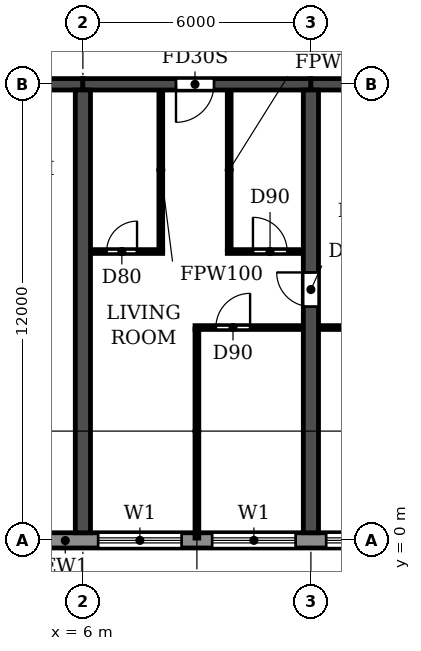
"""IFC4 building model, lengths in metres.
Left out: names, types, materials, properties, quantities, classifications, styles, units other than length and angle.
Written with IfcOpenShell. Run it as: python <this file> out.ifc"""

import sys

from ifc_helpers import new_model, si_unit, direction, frame, frame_2d, origin, place, context, subcontext, project, spatial, rectangle, extrude, element, fill, save


model = new_model("IFC4")
c1 = context("Model", 3, precision=1e-05, world=origin(), true_north=direction((0.0, 1.0)))
c2 = subcontext(c1, "Body", "Model", "MODEL_VIEW")
j1 = project(units=[si_unit("LENGTHUNIT", "METRE"), si_unit("PLANEANGLEUNIT", "RADIAN")], contexts=[c1])
p1 = place(None, origin())
s1 = spatial("IfcSite", under=j1, at=p1, CompositionType="ELEMENT")
p2 = place(p1, origin())
s2 = spatial("IfcBuilding", under=s1, at=p2, CompositionType="ELEMENT")
p3 = place(p2, frame((0.0, 0.0, 26.7)))
s3 = spatial("IfcBuildingStorey", under=s2, at=p3, CompositionType="ELEMENT", Elevation=26.7)
p4 = place(p3, frame((6.0, 0.2, 0.0), z_axis=(0.0, 0.0, 1.0), x_axis=(0.0, 1.0, 0.0)))
e1 = element("IfcWall", 1, at=p4, inside=s3, PredefinedType="SHEAR", context=c2, shape_type="SweptSolid", body=[
    extrude(rectangle(XDim=11.65, YDim=0.4, at=frame_2d((5.825, 0.0))), origin(), (0.0, 0.0, 1.0), 3.05),
])
p5 = place(p3, frame((12.0, 0.2, 0.0), z_axis=(0.0, 0.0, 1.0), x_axis=(0.0, 1.0, 0.0)))
e2 = element("IfcWall", 2, at=p5, inside=s3, PredefinedType="SHEAR", context=c2, shape_type="SweptSolid", body=[
    extrude(rectangle(XDim=11.65, YDim=0.4, at=frame_2d((5.825, 0.0))), origin(), (0.0, 0.0, 1.0), 3.05),
])
p6 = place(p5, frame((5.95, 0.0, 0.0)))
e3 = element("IfcOpeningElement", 3, at=p6, cuts=e2, PredefinedType="OPENING", context=c2, shape_type="SweptSolid", body=[
    extrude(rectangle(XDim=0.9, YDim=2.1, at=frame_2d((0.45, 1.05))), frame((0.0, 0.21, 0.0), z_axis=(0.0, -1.0, 0.0), x_axis=(1.0, 0.0, 0.0)), (0.0, 0.0, 1.0), 0.42),
])
p7 = place(p3, frame((0.2, 12.0, 0.0), z_axis=(0.0, 0.0, 1.0), x_axis=(1.0, 0.0, 0.0)))
e4 = element("IfcWall", 4, at=p7, inside=s3, PredefinedType="SHEAR", context=c2, shape_type="SweptSolid", body=[
    extrude(rectangle(XDim=5.8, YDim=0.3, at=frame_2d((2.9, 0.0))), origin(), (0.0, 0.0, 1.0), 2.45),
])
p8 = place(p7, frame((2.3, 0.0, 0.0)))
e5 = element("IfcOpeningElement", 5, at=p8, cuts=e4, PredefinedType="OPENING", context=c2, shape_type="SweptSolid", body=[
    extrude(rectangle(XDim=1.0, YDim=2.1, at=frame_2d((0.5, 1.05))), frame((0.0, 0.16, 0.0), z_axis=(0.0, -1.0, 0.0), x_axis=(1.0, 0.0, 0.0)), (0.0, 0.0, 1.0), 0.32),
])
p9 = place(p3, frame((6.0, 12.0, 0.0), z_axis=(0.0, 0.0, 1.0), x_axis=(1.0, 0.0, 0.0)))
e6 = element("IfcWall", 6, at=p9, inside=s3, PredefinedType="SHEAR", context=c2, shape_type="SweptSolid", body=[
    extrude(rectangle(XDim=6.0, YDim=0.3, at=frame_2d((3.0, 0.0))), origin(), (0.0, 0.0, 1.0), 2.45),
])
p10 = place(p9, frame((2.45, 0.0, 0.0)))
e7 = element("IfcOpeningElement", 7, at=p10, cuts=e6, PredefinedType="OPENING", context=c2, shape_type="SweptSolid", body=[
    extrude(rectangle(XDim=1.0, YDim=2.1, at=frame_2d((0.5, 1.05))), frame((0.0, 0.16, 0.0), z_axis=(0.0, -1.0, 0.0), x_axis=(1.0, 0.0, 0.0)), (0.0, 0.0, 1.0), 0.32),
])
p11 = place(p3, frame((12.0, 12.0, 0.0), z_axis=(0.0, 0.0, 1.0), x_axis=(1.0, 0.0, 0.0)))
e8 = element("IfcWall", 8, at=p11, inside=s3, PredefinedType="SHEAR", context=c2, shape_type="SweptSolid", body=[
    extrude(rectangle(XDim=6.0, YDim=0.3, at=frame_2d((3.0, 0.0))), origin(), (0.0, 0.0, 1.0), 2.45),
])
p12 = place(p3, frame((4.683, 0.0, 0.0), z_axis=(0.0, 0.0, 1.0), x_axis=(1.0, 0.0, 0.0)))
e9 = element("IfcWall", 9, at=p12, inside=s3, PredefinedType="STANDARD", context=c2, shape_type="SweptSolid", body=[
    extrude(rectangle(XDim=92.634, YDim=0.4, at=frame_2d((46.317, 0.0))), origin(), (0.0, 0.0, 1.0), 3.05),
])
p13 = place(p12, frame((1.717, 0.0, 0.9)))
e10 = element("IfcOpeningElement", 10, at=p13, cuts=e9, PredefinedType="OPENING", context=c2, shape_type="SweptSolid", body=[
    extrude(rectangle(XDim=2.2, YDim=1.5, at=frame_2d((1.1, 0.75))), frame((0.0, 0.21, 0.0), z_axis=(0.0, -1.0, 0.0), x_axis=(1.0, 0.0, 0.0)), (0.0, 0.0, 1.0), 0.42),
])
p14 = place(p12, frame((4.717, 0.0, 0.9)))
e11 = element("IfcOpeningElement", 11, at=p14, cuts=e9, PredefinedType="OPENING", context=c2, shape_type="SweptSolid", body=[
    extrude(rectangle(XDim=2.2, YDim=1.5, at=frame_2d((1.1, 0.75))), frame((0.0, 0.21, 0.0), z_axis=(0.0, -1.0, 0.0), x_axis=(1.0, 0.0, 0.0)), (0.0, 0.0, 1.0), 0.42),
])
p15 = place(p12, frame((7.717, 0.0, 0.9)))
e12 = element("IfcOpeningElement", 12, at=p15, cuts=e9, PredefinedType="OPENING", context=c2, shape_type="SweptSolid", body=[
    extrude(rectangle(XDim=2.2, YDim=1.5, at=frame_2d((1.1, 0.75))), frame((0.0, 0.21, 0.0), z_axis=(0.0, -1.0, 0.0), x_axis=(1.0, 0.0, 0.0)), (0.0, 0.0, 1.0), 0.42),
])
p16 = place(p12, frame((10.717, 0.0, 0.9)))
e13 = element("IfcOpeningElement", 13, at=p16, cuts=e9, PredefinedType="OPENING", context=c2, shape_type="SweptSolid", body=[
    extrude(rectangle(XDim=2.2, YDim=1.5, at=frame_2d((1.1, 0.75))), frame((0.0, 0.21, 0.0), z_axis=(0.0, -1.0, 0.0), x_axis=(1.0, 0.0, 0.0)), (0.0, 0.0, 1.0), 0.42),
])
p17 = place(p12, frame((13.717, 0.0, 0.9)))
e14 = element("IfcOpeningElement", 14, at=p17, cuts=e9, PredefinedType="OPENING", context=c2, shape_type="SweptSolid", body=[
    extrude(rectangle(XDim=2.2, YDim=1.5, at=frame_2d((1.1, 0.75))), frame((0.0, 0.21, 0.0), z_axis=(0.0, -1.0, 0.0), x_axis=(1.0, 0.0, 0.0)), (0.0, 0.0, 1.0), 0.42),
])
p18 = place(p12, frame((16.717, 0.0, 0.9)))
e15 = element("IfcOpeningElement", 15, at=p18, cuts=e9, PredefinedType="OPENING", context=c2, shape_type="SweptSolid", body=[
    extrude(rectangle(XDim=2.2, YDim=1.5, at=frame_2d((1.1, 0.75))), frame((0.0, 0.21, 0.0), z_axis=(0.0, -1.0, 0.0), x_axis=(1.0, 0.0, 0.0)), (0.0, 0.0, 1.0), 0.42),
])
p19 = place(p12, frame((19.917, 0.0, 0.0)))
e16 = element("IfcOpeningElement", 16, at=p19, cuts=e9, PredefinedType="OPENING", context=c2, shape_type="SweptSolid", body=[
    extrude(rectangle(XDim=1.8, YDim=2.4, at=frame_2d((0.9, 1.2))), frame((0.0, 0.21, 0.0), z_axis=(0.0, -1.0, 0.0), x_axis=(1.0, 0.0, 0.0)), (0.0, 0.0, 1.0), 0.42),
])
p20 = place(p12, frame((22.717, 0.0, 0.9)))
e17 = element("IfcOpeningElement", 17, at=p20, cuts=e9, PredefinedType="OPENING", context=c2, shape_type="SweptSolid", body=[
    extrude(rectangle(XDim=2.2, YDim=1.5, at=frame_2d((1.1, 0.75))), frame((0.0, 0.21, 0.0), z_axis=(0.0, -1.0, 0.0), x_axis=(1.0, 0.0, 0.0)), (0.0, 0.0, 1.0), 0.42),
])
p21 = place(p12, frame((25.717, 0.0, 0.9)))
e18 = element("IfcOpeningElement", 18, at=p21, cuts=e9, PredefinedType="OPENING", context=c2, shape_type="SweptSolid", body=[
    extrude(rectangle(XDim=2.2, YDim=1.5, at=frame_2d((1.1, 0.75))), frame((0.0, 0.21, 0.0), z_axis=(0.0, -1.0, 0.0), x_axis=(1.0, 0.0, 0.0)), (0.0, 0.0, 1.0), 0.42),
])
p22 = place(p12, frame((28.717, 0.0, 0.9)))
e19 = element("IfcOpeningElement", 19, at=p22, cuts=e9, PredefinedType="OPENING", context=c2, shape_type="SweptSolid", body=[
    extrude(rectangle(XDim=2.2, YDim=1.5, at=frame_2d((1.1, 0.75))), frame((0.0, 0.21, 0.0), z_axis=(0.0, -1.0, 0.0), x_axis=(1.0, 0.0, 0.0)), (0.0, 0.0, 1.0), 0.42),
])
p23 = place(p12, frame((31.917, 0.0, 0.0)))
e20 = element("IfcOpeningElement", 20, at=p23, cuts=e9, PredefinedType="OPENING", context=c2, shape_type="SweptSolid", body=[
    extrude(rectangle(XDim=1.8, YDim=2.4, at=frame_2d((0.9, 1.2))), frame((0.0, 0.21, 0.0), z_axis=(0.0, -1.0, 0.0), x_axis=(1.0, 0.0, 0.0)), (0.0, 0.0, 1.0), 0.42),
])
p24 = place(p12, frame((34.717, 0.0, 0.9)))
e21 = element("IfcOpeningElement", 21, at=p24, cuts=e9, PredefinedType="OPENING", context=c2, shape_type="SweptSolid", body=[
    extrude(rectangle(XDim=2.2, YDim=1.5, at=frame_2d((1.1, 0.75))), frame((0.0, 0.21, 0.0), z_axis=(0.0, -1.0, 0.0), x_axis=(1.0, 0.0, 0.0)), (0.0, 0.0, 1.0), 0.42),
])
p25 = place(p12, frame((37.717, 0.0, 0.9)))
e22 = element("IfcOpeningElement", 22, at=p25, cuts=e9, PredefinedType="OPENING", context=c2, shape_type="SweptSolid", body=[
    extrude(rectangle(XDim=2.2, YDim=1.5, at=frame_2d((1.1, 0.75))), frame((0.0, 0.21, 0.0), z_axis=(0.0, -1.0, 0.0), x_axis=(1.0, 0.0, 0.0)), (0.0, 0.0, 1.0), 0.42),
])
p26 = place(p12, frame((40.717, 0.0, 0.9)))
e23 = element("IfcOpeningElement", 23, at=p26, cuts=e9, PredefinedType="OPENING", context=c2, shape_type="SweptSolid", body=[
    extrude(rectangle(XDim=2.2, YDim=1.5, at=frame_2d((1.1, 0.75))), frame((0.0, 0.21, 0.0), z_axis=(0.0, -1.0, 0.0), x_axis=(1.0, 0.0, 0.0)), (0.0, 0.0, 1.0), 0.42),
])
p27 = place(p12, frame((43.917, 0.0, 0.0)))
e24 = element("IfcOpeningElement", 24, at=p27, cuts=e9, PredefinedType="OPENING", context=c2, shape_type="SweptSolid", body=[
    extrude(rectangle(XDim=1.8, YDim=2.4, at=frame_2d((0.9, 1.2))), frame((0.0, 0.21, 0.0), z_axis=(0.0, -1.0, 0.0), x_axis=(1.0, 0.0, 0.0)), (0.0, 0.0, 1.0), 0.42),
])
p28 = place(p12, frame((46.717, 0.0, 0.9)))
e25 = element("IfcOpeningElement", 25, at=p28, cuts=e9, PredefinedType="OPENING", context=c2, shape_type="SweptSolid", body=[
    extrude(rectangle(XDim=2.2, YDim=1.5, at=frame_2d((1.1, 0.75))), frame((0.0, 0.21, 0.0), z_axis=(0.0, -1.0, 0.0), x_axis=(1.0, 0.0, 0.0)), (0.0, 0.0, 1.0), 0.42),
])
p29 = place(p12, frame((49.717, 0.0, 0.9)))
e26 = element("IfcOpeningElement", 26, at=p29, cuts=e9, PredefinedType="OPENING", context=c2, shape_type="SweptSolid", body=[
    extrude(rectangle(XDim=2.2, YDim=1.5, at=frame_2d((1.1, 0.75))), frame((0.0, 0.21, 0.0), z_axis=(0.0, -1.0, 0.0), x_axis=(1.0, 0.0, 0.0)), (0.0, 0.0, 1.0), 0.42),
])
p30 = place(p12, frame((52.717, 0.0, 0.9)))
e27 = element("IfcOpeningElement", 27, at=p30, cuts=e9, PredefinedType="OPENING", context=c2, shape_type="SweptSolid", body=[
    extrude(rectangle(XDim=2.2, YDim=1.5, at=frame_2d((1.1, 0.75))), frame((0.0, 0.21, 0.0), z_axis=(0.0, -1.0, 0.0), x_axis=(1.0, 0.0, 0.0)), (0.0, 0.0, 1.0), 0.42),
])
p31 = place(p12, frame((55.717, 0.0, 0.9)))
e28 = element("IfcOpeningElement", 28, at=p31, cuts=e9, PredefinedType="OPENING", context=c2, shape_type="SweptSolid", body=[
    extrude(rectangle(XDim=2.2, YDim=1.5, at=frame_2d((1.1, 0.75))), frame((0.0, 0.21, 0.0), z_axis=(0.0, -1.0, 0.0), x_axis=(1.0, 0.0, 0.0)), (0.0, 0.0, 1.0), 0.42),
])
p32 = place(p12, frame((58.917, 0.0, 0.0)))
e29 = element("IfcOpeningElement", 29, at=p32, cuts=e9, PredefinedType="OPENING", context=c2, shape_type="SweptSolid", body=[
    extrude(rectangle(XDim=1.8, YDim=2.4, at=frame_2d((0.9, 1.2))), frame((0.0, 0.21, 0.0), z_axis=(0.0, -1.0, 0.0), x_axis=(1.0, 0.0, 0.0)), (0.0, 0.0, 1.0), 0.42),
])
p33 = place(p12, frame((61.717, 0.0, 0.9)))
e30 = element("IfcOpeningElement", 30, at=p33, cuts=e9, PredefinedType="OPENING", context=c2, shape_type="SweptSolid", body=[
    extrude(rectangle(XDim=2.2, YDim=1.5, at=frame_2d((1.1, 0.75))), frame((0.0, 0.21, 0.0), z_axis=(0.0, -1.0, 0.0), x_axis=(1.0, 0.0, 0.0)), (0.0, 0.0, 1.0), 0.42),
])
p34 = place(p12, frame((64.717, 0.0, 0.9)))
e31 = element("IfcOpeningElement", 31, at=p34, cuts=e9, PredefinedType="OPENING", context=c2, shape_type="SweptSolid", body=[
    extrude(rectangle(XDim=2.2, YDim=1.5, at=frame_2d((1.1, 0.75))), frame((0.0, 0.21, 0.0), z_axis=(0.0, -1.0, 0.0), x_axis=(1.0, 0.0, 0.0)), (0.0, 0.0, 1.0), 0.42),
])
p35 = place(p12, frame((67.717, 0.0, 0.9)))
e32 = element("IfcOpeningElement", 32, at=p35, cuts=e9, PredefinedType="OPENING", context=c2, shape_type="SweptSolid", body=[
    extrude(rectangle(XDim=2.2, YDim=1.5, at=frame_2d((1.1, 0.75))), frame((0.0, 0.21, 0.0), z_axis=(0.0, -1.0, 0.0), x_axis=(1.0, 0.0, 0.0)), (0.0, 0.0, 1.0), 0.42),
])
p36 = place(p12, frame((70.917, 0.0, 0.0)))
e33 = element("IfcOpeningElement", 33, at=p36, cuts=e9, PredefinedType="OPENING", context=c2, shape_type="SweptSolid", body=[
    extrude(rectangle(XDim=1.8, YDim=2.4, at=frame_2d((0.9, 1.2))), frame((0.0, 0.21, 0.0), z_axis=(0.0, -1.0, 0.0), x_axis=(1.0, 0.0, 0.0)), (0.0, 0.0, 1.0), 0.42),
])
p37 = place(p12, frame((73.717, 0.0, 0.9)))
e34 = element("IfcOpeningElement", 34, at=p37, cuts=e9, PredefinedType="OPENING", context=c2, shape_type="SweptSolid", body=[
    extrude(rectangle(XDim=2.2, YDim=1.5, at=frame_2d((1.1, 0.75))), frame((0.0, 0.21, 0.0), z_axis=(0.0, -1.0, 0.0), x_axis=(1.0, 0.0, 0.0)), (0.0, 0.0, 1.0), 0.42),
])
p38 = place(p12, frame((76.717, 0.0, 0.9)))
e35 = element("IfcOpeningElement", 35, at=p38, cuts=e9, PredefinedType="OPENING", context=c2, shape_type="SweptSolid", body=[
    extrude(rectangle(XDim=2.2, YDim=1.5, at=frame_2d((1.1, 0.75))), frame((0.0, 0.21, 0.0), z_axis=(0.0, -1.0, 0.0), x_axis=(1.0, 0.0, 0.0)), (0.0, 0.0, 1.0), 0.42),
])
p39 = place(p12, frame((79.717, 0.0, 0.9)))
e36 = element("IfcOpeningElement", 36, at=p39, cuts=e9, PredefinedType="OPENING", context=c2, shape_type="SweptSolid", body=[
    extrude(rectangle(XDim=2.2, YDim=1.5, at=frame_2d((1.1, 0.75))), frame((0.0, 0.21, 0.0), z_axis=(0.0, -1.0, 0.0), x_axis=(1.0, 0.0, 0.0)), (0.0, 0.0, 1.0), 0.42),
])
p40 = place(p12, frame((82.717, 0.0, 0.9)))
e37 = element("IfcOpeningElement", 37, at=p40, cuts=e9, PredefinedType="OPENING", context=c2, shape_type="SweptSolid", body=[
    extrude(rectangle(XDim=2.2, YDim=1.5, at=frame_2d((1.1, 0.75))), frame((0.0, 0.21, 0.0), z_axis=(0.0, -1.0, 0.0), x_axis=(1.0, 0.0, 0.0)), (0.0, 0.0, 1.0), 0.42),
])
p41 = place(p12, frame((85.717, 0.0, 0.9)))
e38 = element("IfcOpeningElement", 38, at=p41, cuts=e9, PredefinedType="OPENING", context=c2, shape_type="SweptSolid", body=[
    extrude(rectangle(XDim=2.2, YDim=1.5, at=frame_2d((1.1, 0.75))), frame((0.0, 0.21, 0.0), z_axis=(0.0, -1.0, 0.0), x_axis=(1.0, 0.0, 0.0)), (0.0, 0.0, 1.0), 0.42),
])
p42 = place(p12, frame((88.717, 0.0, 0.9)))
e39 = element("IfcOpeningElement", 39, at=p42, cuts=e9, PredefinedType="OPENING", context=c2, shape_type="SweptSolid", body=[
    extrude(rectangle(XDim=2.2, YDim=1.5, at=frame_2d((1.1, 0.75))), frame((0.0, 0.21, 0.0), z_axis=(0.0, -1.0, 0.0), x_axis=(1.0, 0.0, 0.0)), (0.0, 0.0, 1.0), 0.42),
])
p43 = place(p3, frame((8.95, 5.6, 0.0), z_axis=(0.0, 0.0, 1.0), x_axis=(1.0, 0.0, 0.0)))
e40 = element("IfcWall", 40, at=p43, inside=s3, PredefinedType="PARTITIONING", context=c2, shape_type="SweptSolid", body=[
    extrude(rectangle(XDim=2.84, YDim=0.1, at=frame_2d((1.42, 0.0))), origin(), (0.0, 0.0, 1.0), 3.05),
])
p44 = place(p43, frame((0.55, 0.0, 0.0)))
e41 = element("IfcOpeningElement", 41, at=p44, cuts=e40, PredefinedType="OPENING", context=c2, shape_type="SweptSolid", body=[
    extrude(rectangle(XDim=0.9, YDim=2.1, at=frame_2d((0.45, 1.05))), frame((0.0, 0.06, 0.0), z_axis=(0.0, -1.0, 0.0), x_axis=(1.0, 0.0, 0.0)), (0.0, 0.0, 1.0), 0.12),
])
p45 = place(p3, frame((12.21, 5.6, 0.0), z_axis=(0.0, 0.0, 1.0), x_axis=(1.0, 0.0, 0.0)))
e42 = element("IfcWall", 42, at=p45, inside=s3, PredefinedType="PARTITIONING", context=c2, shape_type="SweptSolid", body=[
    extrude(rectangle(XDim=5.58, YDim=0.1, at=frame_2d((2.79, 0.0))), origin(), (0.0, 0.0, 1.0), 3.05),
])
p46 = place(p45, frame((1.39, 0.0, 0.0)))
e43 = element("IfcOpeningElement", 43, at=p46, cuts=e42, PredefinedType="OPENING", context=c2, shape_type="SweptSolid", body=[
    extrude(rectangle(XDim=0.9, YDim=2.1, at=frame_2d((0.45, 1.05))), frame((0.0, 0.06, 0.0), z_axis=(0.0, -1.0, 0.0), x_axis=(1.0, 0.0, 0.0)), (0.0, 0.0, 1.0), 0.12),
])
p47 = place(p45, frame((3.29, 0.0, 0.0)))
e44 = element("IfcOpeningElement", 44, at=p47, cuts=e42, PredefinedType="OPENING", context=c2, shape_type="SweptSolid", body=[
    extrude(rectangle(XDim=0.9, YDim=2.1, at=frame_2d((0.45, 1.05))), frame((0.0, 0.06, 0.0), z_axis=(0.0, -1.0, 0.0), x_axis=(1.0, 0.0, 0.0)), (0.0, 0.0, 1.0), 0.12),
])
p48 = place(p3, frame((6.21, 7.6, 0.0), z_axis=(0.0, 0.0, 1.0), x_axis=(1.0, 0.0, 0.0)))
e45 = element("IfcWall", 45, at=p48, inside=s3, PredefinedType="PARTITIONING", context=c2, shape_type="SweptSolid", body=[
    extrude(rectangle(XDim=1.89, YDim=0.1, at=frame_2d((0.945, 0.0))), origin(), (0.0, 0.0, 1.0), 3.05),
])
p49 = place(p48, frame((0.415, 0.0, 0.0)))
e46 = element("IfcOpeningElement", 46, at=p49, cuts=e45, PredefinedType="OPENING", context=c2, shape_type="SweptSolid", body=[
    extrude(rectangle(XDim=0.8, YDim=2.1, at=frame_2d((0.4, 1.05))), frame((0.0, 0.06, 0.0), z_axis=(0.0, -1.0, 0.0), x_axis=(1.0, 0.0, 0.0)), (0.0, 0.0, 1.0), 0.12),
])
p50 = place(p3, frame((9.8, 7.6, 0.0), z_axis=(0.0, 0.0, 1.0), x_axis=(1.0, 0.0, 0.0)))
e47 = element("IfcWall", 47, at=p50, inside=s3, PredefinedType="PARTITIONING", context=c2, shape_type="SweptSolid", body=[
    extrude(rectangle(XDim=1.99, YDim=0.1, at=frame_2d((0.995, 0.0))), origin(), (0.0, 0.0, 1.0), 3.05),
])
p51 = place(p50, frame((0.675, 0.0, 0.0)))
e48 = element("IfcOpeningElement", 48, at=p51, cuts=e47, PredefinedType="OPENING", context=c2, shape_type="SweptSolid", body=[
    extrude(rectangle(XDim=0.9, YDim=2.1, at=frame_2d((0.45, 1.05))), frame((0.0, 0.06, 0.0), z_axis=(0.0, -1.0, 0.0), x_axis=(1.0, 0.0, 0.0)), (0.0, 0.0, 1.0), 0.12),
])
p52 = place(p3, frame((8.05, 7.65, 0.0), z_axis=(0.0, 0.0, 1.0), x_axis=(0.0, 1.0, 0.0)))
e49 = element("IfcWall", 49, at=p52, inside=s3, PredefinedType="PARTITIONING", context=c2, shape_type="SweptSolid", body=[
    extrude(rectangle(XDim=4.19, YDim=0.1, at=frame_2d((2.095, 0.0))), origin(), (0.0, 0.0, 1.0), 3.05),
])
p53 = place(p3, frame((9.0, 0.06, 0.0), z_axis=(0.0, 0.0, 1.0), x_axis=(0.0, 1.0, 0.0)))
e50 = element("IfcWall", 50, at=p53, inside=s3, PredefinedType="PARTITIONING", context=c2, shape_type="SweptSolid", body=[
    extrude(rectangle(XDim=5.49, YDim=0.1, at=frame_2d((2.745, 0.0))), origin(), (0.0, 0.0, 1.0), 3.05),
])
p54 = place(p3, frame((9.85, 7.65, 0.0), z_axis=(0.0, 0.0, 1.0), x_axis=(0.0, 1.0, 0.0)))
e51 = element("IfcWall", 51, at=p54, inside=s3, PredefinedType="PARTITIONING", context=c2, shape_type="SweptSolid", body=[
    extrude(rectangle(XDim=4.19, YDim=0.1, at=frame_2d((2.095, 0.0))), origin(), (0.0, 0.0, 1.0), 3.05),
])
p55 = place(p13, origin())
e52 = element("IfcWindow", 52, at=p55, inside=s3, PartitioningType="DOUBLE_PANEL_HORIZONTAL", PredefinedType="WINDOW", context=c2, shape_type="SweptSolid", body=[
    extrude(rectangle(XDim=2.2, YDim=1.5, at=frame_2d((1.1, 0.75))), frame((0.0, 0.03, 0.0), z_axis=(0.0, -1.0, 0.0), x_axis=(1.0, 0.0, 0.0)), (0.0, 0.0, 1.0), 0.06),
])
fill(e10, e52)
p56 = place(p14, origin())
e53 = element("IfcWindow", 53, at=p56, inside=s3, PartitioningType="DOUBLE_PANEL_HORIZONTAL", PredefinedType="WINDOW", context=c2, shape_type="SweptSolid", body=[
    extrude(rectangle(XDim=2.2, YDim=1.5, at=frame_2d((1.1, 0.75))), frame((0.0, 0.03, 0.0), z_axis=(0.0, -1.0, 0.0), x_axis=(1.0, 0.0, 0.0)), (0.0, 0.0, 1.0), 0.06),
])
fill(e11, e53)
p57 = place(p15, origin())
e54 = element("IfcWindow", 54, at=p57, inside=s3, PartitioningType="DOUBLE_PANEL_HORIZONTAL", PredefinedType="WINDOW", context=c2, shape_type="SweptSolid", body=[
    extrude(rectangle(XDim=2.2, YDim=1.5, at=frame_2d((1.1, 0.75))), frame((0.0, 0.03, 0.0), z_axis=(0.0, -1.0, 0.0), x_axis=(1.0, 0.0, 0.0)), (0.0, 0.0, 1.0), 0.06),
])
fill(e12, e54)
p58 = place(p49, origin())
e55 = element("IfcDoor", 55, at=p58, inside=s3, OperationType="SINGLE_SWING_RIGHT", PredefinedType="DOOR", context=c2, shape_type="SweptSolid", body=[
    extrude(rectangle(XDim=0.8, YDim=2.1, at=frame_2d((0.4, 1.05))), frame((0.0, 0.025, 0.0), z_axis=(0.0, -1.0, 0.0), x_axis=(1.0, 0.0, 0.0)), (0.0, 0.0, 1.0), 0.05),
])
fill(e46, e55)
p59 = place(p10, frame((1.0, 0.0, 0.0), z_axis=(0.0, 0.0, 1.0), x_axis=(-1.0, 0.0, 0.0)))
e56 = element("IfcDoor", 56, at=p59, inside=s3, OperationType="SINGLE_SWING_RIGHT", PredefinedType="DOOR", context=c2, shape_type="SweptSolid", body=[
    extrude(rectangle(XDim=1.0, YDim=2.1, at=frame_2d((0.5, 1.05))), frame((0.0, 0.025, 0.0), z_axis=(0.0, -1.0, 0.0), x_axis=(1.0, 0.0, 0.0)), (0.0, 0.0, 1.0), 0.05),
])
fill(e7, e56)
p60 = place(p44, origin())
e57 = element("IfcDoor", 57, at=p60, inside=s3, OperationType="SINGLE_SWING_RIGHT", PredefinedType="DOOR", context=c2, shape_type="SweptSolid", body=[
    extrude(rectangle(XDim=0.9, YDim=2.1, at=frame_2d((0.45, 1.05))), frame((0.0, 0.025, 0.0), z_axis=(0.0, -1.0, 0.0), x_axis=(1.0, 0.0, 0.0)), (0.0, 0.0, 1.0), 0.05),
])
fill(e41, e57)
p61 = place(p51, origin())
e58 = element("IfcDoor", 58, at=p61, inside=s3, OperationType="SINGLE_SWING_LEFT", PredefinedType="DOOR", context=c2, shape_type="SweptSolid", body=[
    extrude(rectangle(XDim=0.9, YDim=2.1, at=frame_2d((0.45, 1.05))), frame((0.0, 0.025, 0.0), z_axis=(0.0, -1.0, 0.0), x_axis=(1.0, 0.0, 0.0)), (0.0, 0.0, 1.0), 0.05),
])
fill(e48, e58)
p62 = place(p6, origin())
e59 = element("IfcDoor", 59, at=p62, inside=s3, OperationType="SINGLE_SWING_RIGHT", PredefinedType="DOOR", context=c2, shape_type="SweptSolid", body=[
    extrude(rectangle(XDim=0.9, YDim=2.1, at=frame_2d((0.45, 1.05))), frame((0.0, 0.025, 0.0), z_axis=(0.0, -1.0, 0.0), x_axis=(1.0, 0.0, 0.0)), (0.0, 0.0, 1.0), 0.05),
])
fill(e3, e59)
save(model, sys.argv[1])
